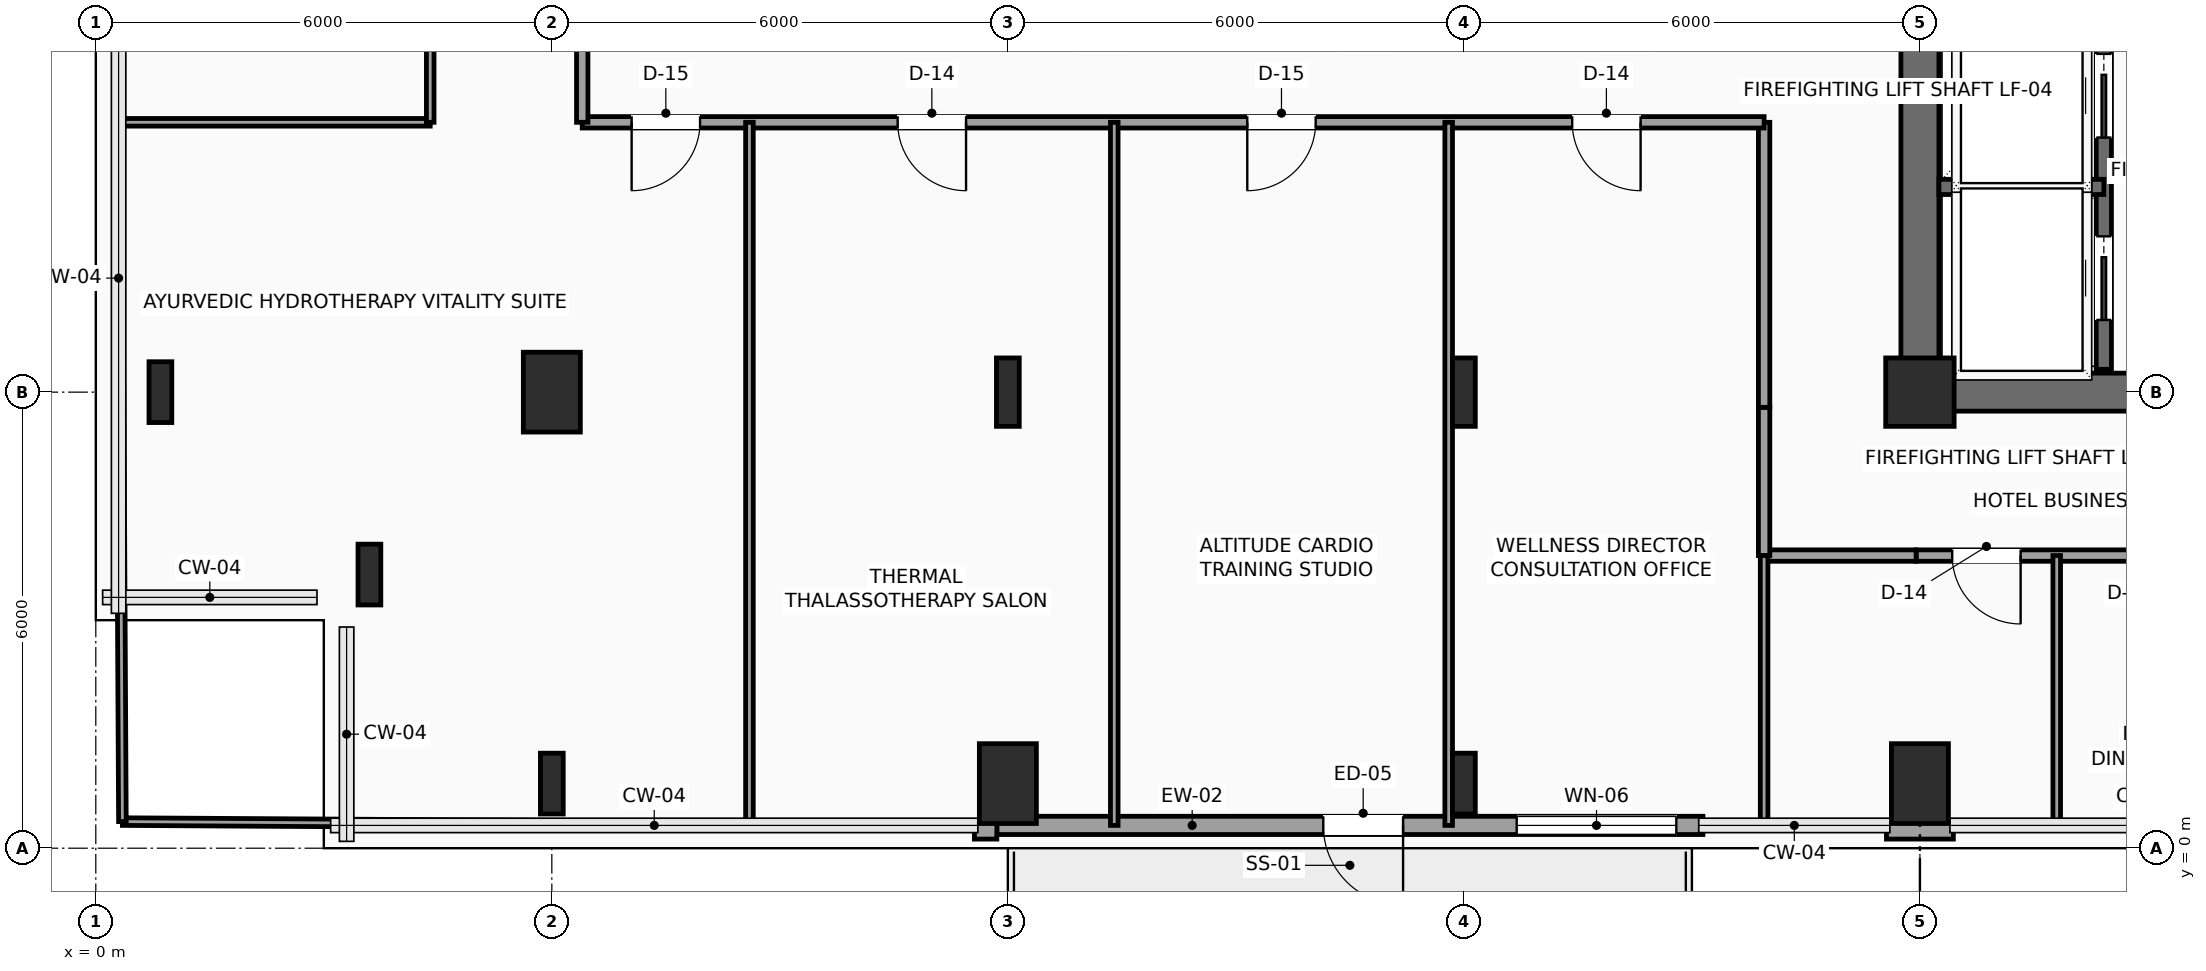
"""IFC4 building model, lengths in metres.
Left out: names, types, materials, properties, quantities, classifications, styles, units other than length and angle.
Written with IfcOpenShell. Run it as: python <this file> out.ifc"""

import sys

from ifc_helpers import new_model, si_unit, direction, frame, frame_2d, origin, origin_2d, place, context, subcontext, project, spatial, rectangle, i_section, extrude, element, fill, save


model = new_model("IFC4")
c1 = context("Model", 3, precision=1e-05, world=origin(), true_north=direction((0.0, 1.0)))
c2 = subcontext(c1, "Body", "Model", "MODEL_VIEW")
j1 = project(units=[si_unit("LENGTHUNIT", "METRE"), si_unit("PLANEANGLEUNIT", "RADIAN")], contexts=[c1])
p1 = place(None, origin())
s1 = spatial("IfcSite", under=j1, at=p1, CompositionType="ELEMENT")
p2 = place(p1, origin())
s2 = spatial("IfcBuilding", under=s1, at=p2, CompositionType="ELEMENT")
p3 = place(p2, frame((0.0, 0.0, 191.7)))
s3 = spatial("IfcBuildingStorey", under=s2, at=p3, CompositionType="ELEMENT", Elevation=191.7)
p4 = place(p3, frame((24.0, 6.0, 0.0), z_axis=(0.0, 0.0, 1.0), x_axis=(1.0, 0.0, 0.0)))
e1 = element("IfcColumn", 1, at=p4, inside=s3, PredefinedType="COLUMN", context=c2, shape_type="SweptSolid", body=[
    extrude(rectangle(XDim=0.9, YDim=0.9, at=origin_2d()), origin(), (0.0, 0.0, 1.0), 3.75),
])
for number, where, z_axis, x_axis in (
    (2, (3.6, 3.6, 0.0), (0.0, 0.0, 1.0), (1.0, 0.0, 0.0)),
    (3, (0.85, 6.0, 0.0), (0.0, 0.0, 1.0), (1.0, 0.0, 0.0)),
    (4, (6.0, 0.85, 0.0), (0.0, 0.0, 1.0), (1.0, 0.0, 0.0)),
):
    element("IfcColumn", number, at=place(p3, frame(where, z_axis=z_axis, x_axis=x_axis)), inside=s3, PredefinedType="COLUMN", context=c2, shape_type="SweptSolid", body=[
        extrude(i_section(OverallWidth=0.3, OverallDepth=0.8, WebThickness=0.018, FlangeThickness=0.033, FilletRadius=0.03, at=origin_2d()), origin(), (0.0, 0.0, 1.0), 3.75),
    ])
for number, where, z_axis, x_axis in (
    (5, (6.0, 6.0, 0.0), (0.0, 0.0, 1.0), (1.0, 0.0, 0.0)),
    (6, (12.0, 0.85, 0.0), (0.0, 0.0, 1.0), (1.0, 0.0, 0.0)),
):
    element("IfcColumn", number, at=place(p3, frame(where, z_axis=z_axis, x_axis=x_axis)), inside=s3, PredefinedType="COLUMN", context=c2, shape_type="SweptSolid", body=[
        extrude(rectangle(XDim=0.75, YDim=1.05, at=origin_2d()), origin(), (0.0, 0.0, 1.0), 3.75),
    ])
p5 = place(p3, frame((12.0, 6.0, 0.0), z_axis=(0.0, 0.0, 1.0), x_axis=(1.0, 0.0, 0.0)))
e7 = element("IfcColumn", 7, at=p5, inside=s3, PredefinedType="COLUMN", context=c2, shape_type="SweptSolid", body=[
    extrude(i_section(OverallWidth=0.3, OverallDepth=0.9, WebThickness=0.019, FlangeThickness=0.035, FilletRadius=0.03, at=origin_2d()), origin(), (0.0, 0.0, 1.0), 3.75),
])
p6 = place(p3, frame((18.0, 0.85, 0.0), z_axis=(0.0, 0.0, 1.0), x_axis=(1.0, 0.0, 0.0)))
e8 = element("IfcColumn", 8, at=p6, inside=s3, PredefinedType="COLUMN", context=c2, shape_type="SweptSolid", body=[
    extrude(i_section(OverallWidth=0.3, OverallDepth=0.8, WebThickness=0.018, FlangeThickness=0.033, FilletRadius=0.03, at=origin_2d()), origin(), (0.0, 0.0, 1.0), 3.75),
])
p7 = place(p3, frame((18.0, 6.0, 0.0), z_axis=(0.0, 0.0, 1.0), x_axis=(1.0, 0.0, 0.0)))
e9 = element("IfcColumn", 9, at=p7, inside=s3, PredefinedType="COLUMN", context=c2, shape_type="SweptSolid", body=[
    extrude(i_section(OverallWidth=0.3, OverallDepth=0.9, WebThickness=0.019, FlangeThickness=0.035, FilletRadius=0.03, at=origin_2d()), origin(), (0.0, 0.0, 1.0), 3.75),
])
p8 = place(p3, frame((24.0, 0.85, 0.0), z_axis=(0.0, 0.0, 1.0), x_axis=(1.0, 0.0, 0.0)))
e10 = element("IfcColumn", 10, at=p8, inside=s3, PredefinedType="COLUMN", context=c2, shape_type="SweptSolid", body=[
    extrude(rectangle(XDim=0.75, YDim=1.05, at=origin_2d()), origin(), (0.0, 0.0, 1.0), 3.75),
])
p9 = place(p3, frame((21.145, 0.3, 0.0), z_axis=(0.0, 0.0, 1.0), x_axis=(-1.0, 0.0, 0.0)))
e11 = element("IfcWall", 11, at=p9, inside=s3, PredefinedType="SOLIDWALL", context=c2, shape_type="SweptSolid", body=[
    extrude(rectangle(XDim=9.29, YDim=0.24, at=frame_2d((4.645, 0.0))), origin(), (0.0, 0.0, 1.0), 3.54),
])
p10 = place(p9, frame((3.945, 0.0, 0.0)))
e12 = element("IfcOpeningElement", 12, at=p10, cuts=e11, PredefinedType="OPENING", context=c2, shape_type="SweptSolid", body=[
    extrude(rectangle(XDim=1.05, YDim=2.2, at=frame_2d((0.525, 1.1))), frame((0.0, 0.13, 0.0), z_axis=(0.0, -1.0, 0.0), x_axis=(1.0, 0.0, 0.0)), (0.0, 0.0, 1.0), 0.26),
])
p11 = place(p9, frame((0.35, 0.0, 0.85)))
e13 = element("IfcOpeningElement", 13, at=p11, cuts=e11, PredefinedType="OPENING", context=c2, shape_type="SweptSolid", body=[
    extrude(rectangle(XDim=2.1, YDim=2.2, at=frame_2d((1.05, 1.1))), frame((0.0, 0.13, 0.0), z_axis=(0.0, -1.0, 0.0), x_axis=(1.0, 0.0, 0.0)), (0.0, 0.0, 1.0), 0.26),
])
p12 = place(p3, frame((24.44, 0.24, 0.0), z_axis=(0.0, 0.0, 1.0), x_axis=(-1.0, 0.0, 0.0)))
e14 = element("IfcWall", 14, at=p12, inside=s3, PredefinedType="SOLIDWALL", context=c2, shape_type="SweptSolid", body=[
    extrude(rectangle(XDim=0.88, YDim=0.24, at=frame_2d((0.44, 0.0))), origin(), (0.0, 0.0, 1.0), 3.54),
])
p13 = place(p3, frame((11.855, 0.24, 0.0), z_axis=(0.0, 0.0, 1.0), x_axis=(-1.0, 0.0, 0.0)))
e15 = element("IfcWall", 15, at=p13, inside=s3, PredefinedType="SOLIDWALL", context=c2, shape_type="SweptSolid", body=[
    extrude(rectangle(XDim=0.295, YDim=0.24, at=frame_2d((0.147, 0.0))), origin(), (0.0, 0.0, 1.0), 3.54),
])
p14 = place(p3, frame((24.0, 6.0, 0.0), z_axis=(0.0, 0.0, 1.0), x_axis=(1.0, 0.0, 0.0)))
e16 = element("IfcWall", 16, at=p14, inside=s3, PredefinedType="SHEAR", context=c2, shape_type="SweptSolid", body=[
    extrude(rectangle(XDim=9.6, YDim=0.5, at=frame_2d((4.8, 0.0))), origin(), (0.0, 0.0, 1.0), 3.54),
])
p15 = place(p3, frame((24.0, 6.0, 0.0), z_axis=(0.0, 0.0, 1.0), x_axis=(0.0, 1.0, 0.0)))
e17 = element("IfcWall", 17, at=p15, inside=s3, PredefinedType="SHEAR", context=c2, shape_type="SweptSolid", body=[
    extrude(rectangle(XDim=12.0, YDim=0.5, at=frame_2d((6.0, 0.0))), origin(), (0.0, 0.0, 1.0), 3.54),
])
p16 = place(p15, frame((7.15, 0.0, 0.0)))
e18 = element("IfcOpeningElement", 18, at=p16, cuts=e17, PredefinedType="OPENING", context=c2, shape_type="SweptSolid", body=[
    extrude(rectangle(XDim=1.6, YDim=2.3, at=frame_2d((0.8, 1.15))), frame((0.0, 0.26, 0.0), z_axis=(0.0, -1.0, 0.0), x_axis=(1.0, 0.0, 0.0)), (0.0, 0.0, 1.0), 0.52),
])
p17 = place(p3, frame((26.42, 6.3, 0.0), z_axis=(0.0, 0.0, 1.0), x_axis=(0.0, 1.0, 0.0)))
e19 = element("IfcWall", 19, at=p17, inside=s3, PredefinedType="SHEAR", context=c2, shape_type="SweptSolid", body=[
    extrude(rectangle(XDim=4.95, YDim=0.2, at=frame_2d((2.475, 0.0))), origin(), (0.0, 0.0, 1.0), 3.54),
])
p18 = place(p17, frame((0.65, 0.0, 0.0)))
e20 = element("IfcOpeningElement", 20, at=p18, cuts=e19, PredefinedType="OPENING", context=c2, shape_type="SweptSolid", body=[
    extrude(rectangle(XDim=1.1, YDim=2.2, at=frame_2d((0.55, 1.1))), frame((0.0, 0.11, 0.0), z_axis=(0.0, -1.0, 0.0), x_axis=(1.0, 0.0, 0.0)), (0.0, 0.0, 1.0), 0.22),
])
p19 = place(p17, frame((3.05, 0.0, 0.0)))
e21 = element("IfcOpeningElement", 21, at=p19, cuts=e19, PredefinedType="OPENING", context=c2, shape_type="SweptSolid", body=[
    extrude(rectangle(XDim=1.1, YDim=2.2, at=frame_2d((0.55, 1.1))), frame((0.0, 0.11, 0.0), z_axis=(0.0, -1.0, 0.0), x_axis=(1.0, 0.0, 0.0)), (0.0, 0.0, 1.0), 0.22),
])
p20 = place(p3, frame((24.25, 8.7, 0.0), z_axis=(0.0, 0.0, 1.0), x_axis=(1.0, 0.0, 0.0)))
e22 = element("IfcWall", 22, at=p20, inside=s3, PredefinedType="SHEAR", context=c2, shape_type="SweptSolid", body=[
    extrude(rectangle(XDim=2.17, YDim=0.2, at=frame_2d((1.085, 0.0))), origin(), (0.0, 0.0, 1.0), 3.54),
])
p21 = place(p3, frame((36.35, 3.85, 0.0), z_axis=(0.0, 0.0, 1.0), x_axis=(-1.0, 0.0, 0.0)))
e23 = element("IfcWall", 23, at=p21, inside=s3, PredefinedType="PARTITIONING", context=c2, shape_type="SweptSolid", body=[
    extrude(rectangle(XDim=12.4, YDim=0.15, at=frame_2d((6.2, 0.0))), origin(), (0.0, 0.0, 1.0), 3.54),
])
p22 = place(p21, frame((11.025, 0.0, 0.0)))
e24 = element("IfcOpeningElement", 24, at=p22, cuts=e23, PredefinedType="OPENING", context=c2, shape_type="SweptSolid", body=[
    extrude(rectangle(XDim=0.9, YDim=2.1, at=frame_2d((0.45, 1.05))), frame((0.0, 0.085, 0.0), z_axis=(0.0, -1.0, 0.0), x_axis=(1.0, 0.0, 0.0)), (0.0, 0.0, 1.0), 0.17),
])
p23 = place(p21, frame((8.05, 0.0, 0.0)))
e25 = element("IfcOpeningElement", 25, at=p23, cuts=e23, PredefinedType="OPENING", context=c2, shape_type="SweptSolid", body=[
    extrude(rectangle(XDim=0.9, YDim=2.1, at=frame_2d((0.45, 1.05))), frame((0.0, 0.085, 0.0), z_axis=(0.0, -1.0, 0.0), x_axis=(1.0, 0.0, 0.0)), (0.0, 0.0, 1.0), 0.17),
])
p24 = place(p21, frame((3.9, 0.0, 0.0)))
e26 = element("IfcOpeningElement", 26, at=p24, cuts=e23, PredefinedType="OPENING", context=c2, shape_type="SweptSolid", body=[
    extrude(rectangle(XDim=0.9, YDim=2.1, at=frame_2d((0.45, 1.05))), frame((0.0, 0.085, 0.0), z_axis=(0.0, -1.0, 0.0), x_axis=(1.0, 0.0, 0.0)), (0.0, 0.0, 1.0), 0.17),
])
p25 = place(p3, frame((23.95, 3.85, 0.0), z_axis=(0.0, 0.0, 1.0), x_axis=(-1.0, 0.0, 0.0)))
e27 = element("IfcWall", 27, at=p25, inside=s3, PredefinedType="PARTITIONING", context=c2, shape_type="SweptSolid", body=[
    extrude(rectangle(XDim=2.0, YDim=0.15, at=frame_2d((1.0, 0.0))), origin(), (0.0, 0.0, 1.0), 3.54),
])
p26 = place(p3, frame((21.95, 3.85, 0.0), z_axis=(0.0, 0.0, 1.0), x_axis=(0.0, 1.0, 0.0)))
e28 = element("IfcWall", 28, at=p26, inside=s3, PredefinedType="PARTITIONING", context=c2, shape_type="SweptSolid", body=[
    extrude(rectangle(XDim=1.95, YDim=0.15, at=frame_2d((0.975, 0.0))), origin(), (0.0, 0.0, 1.0), 3.54),
])
p27 = place(p3, frame((21.95, 5.8, 0.0), z_axis=(0.0, 0.0, 1.0), x_axis=(0.0, 1.0, 0.0)))
e29 = element("IfcWall", 29, at=p27, inside=s3, PredefinedType="PARTITIONING", context=c2, shape_type="SweptSolid", body=[
    extrude(rectangle(XDim=3.75, YDim=0.15, at=frame_2d((1.875, 0.0))), origin(), (0.0, 0.0, 1.0), 3.54),
])
p28 = place(p3, frame((21.95, 9.55, 0.0), z_axis=(0.0, 0.0, 1.0), x_axis=(-1.0, 0.0, 0.0)))
e30 = element("IfcWall", 30, at=p28, inside=s3, PredefinedType="PARTITIONING", context=c2, shape_type="SweptSolid", body=[
    extrude(rectangle(XDim=15.55, YDim=0.15, at=frame_2d((7.775, 0.0))), origin(), (0.0, 0.0, 1.0), 3.54),
])
p29 = place(p28, frame((14.0, 0.0, 0.0)))
e31 = element("IfcOpeningElement", 31, at=p29, cuts=e30, PredefinedType="OPENING", context=c2, shape_type="SweptSolid", body=[
    extrude(rectangle(XDim=0.9, YDim=2.1, at=frame_2d((0.45, 1.05))), frame((0.0, 0.085, 0.0), z_axis=(0.0, -1.0, 0.0), x_axis=(1.0, 0.0, 0.0)), (0.0, 0.0, 1.0), 0.17),
])
p30 = place(p28, frame((10.5, 0.0, 0.0)))
e32 = element("IfcOpeningElement", 32, at=p30, cuts=e30, PredefinedType="OPENING", context=c2, shape_type="SweptSolid", body=[
    extrude(rectangle(XDim=0.9, YDim=2.1, at=frame_2d((0.45, 1.05))), frame((0.0, 0.085, 0.0), z_axis=(0.0, -1.0, 0.0), x_axis=(1.0, 0.0, 0.0)), (0.0, 0.0, 1.0), 0.17),
])
p31 = place(p28, frame((5.9, 0.0, 0.0)))
e33 = element("IfcOpeningElement", 33, at=p31, cuts=e30, PredefinedType="OPENING", context=c2, shape_type="SweptSolid", body=[
    extrude(rectangle(XDim=0.9, YDim=2.1, at=frame_2d((0.45, 1.05))), frame((0.0, 0.085, 0.0), z_axis=(0.0, -1.0, 0.0), x_axis=(1.0, 0.0, 0.0)), (0.0, 0.0, 1.0), 0.17),
])
p32 = place(p28, frame((1.625, 0.0, 0.0)))
e34 = element("IfcOpeningElement", 34, at=p32, cuts=e30, PredefinedType="OPENING", context=c2, shape_type="SweptSolid", body=[
    extrude(rectangle(XDim=0.9, YDim=2.1, at=frame_2d((0.45, 1.05))), frame((0.0, 0.085, 0.0), z_axis=(0.0, -1.0, 0.0), x_axis=(1.0, 0.0, 0.0)), (0.0, 0.0, 1.0), 0.17),
])
p33 = place(p3, frame((6.4, 9.55, 0.0), z_axis=(0.0, 0.0, 1.0), x_axis=(0.0, 1.0, 0.0)))
e35 = element("IfcWall", 35, at=p33, inside=s3, PredefinedType="PARTITIONING", context=c2, shape_type="SweptSolid", body=[
    extrude(rectangle(XDim=1.7, YDim=0.15, at=frame_2d((0.85, 0.0))), origin(), (0.0, 0.0, 1.0), 3.54),
])
for number, where, z_axis, x_axis in (
    (36, (21.95, 0.3, 0.0), (0.0, 0.0, 1.0), (0.0, 1.0, 0.0)),
    (37, (25.8, 0.3, 0.0), (0.0, 0.0, 1.0), (0.0, 1.0, 0.0)),
):
    element("IfcWall", number, at=place(p3, frame(where, z_axis=z_axis, x_axis=x_axis)), inside=s3, PredefinedType="PARTITIONING", context=c2, shape_type="SweptSolid", body=[
        extrude(rectangle(XDim=3.55, YDim=0.1, at=frame_2d((1.775, 0.0))), origin(), (0.0, 0.0, 1.0), 3.54),
    ])
p34 = place(p3, frame((0.35, 0.35, 0.0), z_axis=(0.0, 0.0, 1.0), x_axis=(0.999981599147, -0.006066412992, 0.0)))
e38 = element("IfcWall", 38, at=p34, inside=s3, PredefinedType="PARTITIONING", context=c2, shape_type="SweptSolid", body=[
    extrude(rectangle(XDim=8.25, YDim=0.1, at=frame_2d((4.125, 0.0))), origin(), (0.0, 0.0, 1.0), 3.54),
])
p35 = place(p3, frame((0.35, 0.35, 0.0), z_axis=(0.0, 0.0, 1.0), x_axis=(-0.005440038388, 0.999985202882, 0.0)))
e39 = element("IfcWall", 39, at=p35, inside=s3, PredefinedType="PARTITIONING", context=c2, shape_type="SweptSolid", body=[
    extrude(rectangle(XDim=9.2, YDim=0.1, at=frame_2d((4.6, 0.0))), origin(), (0.0, 0.0, 1.0), 3.54),
])
for number, where, z_axis, x_axis in (
    (40, (8.6, 0.3, 0.0), (0.0, 0.0, 1.0), (0.0, 1.0, 0.0)),
    (41, (13.4, 0.3, 0.0), (0.0, 0.0, 1.0), (0.0, 1.0, 0.0)),
):
    element("IfcWall", number, at=place(p3, frame(where, z_axis=z_axis, x_axis=x_axis)), inside=s3, PredefinedType="PARTITIONING", context=c2, shape_type="SweptSolid", body=[
        extrude(rectangle(XDim=9.25, YDim=0.1, at=frame_2d((4.625, 0.0))), origin(), (0.0, 0.0, 1.0), 3.54),
    ])
p36 = place(p3, frame((17.8, 0.3, 0.0), z_axis=(0.0, 0.0, 1.0), x_axis=(0.0, 1.0, 0.0)))
e42 = element("IfcWall", 42, at=p36, inside=s3, PredefinedType="PARTITIONING", context=c2, shape_type="SweptSolid", body=[
    extrude(rectangle(XDim=9.25, YDim=0.1, at=frame_2d((4.625, 0.0))), origin(), (0.0, 0.0, 1.0), 3.132),
])
p37 = place(p3, frame((0.3, 9.55, 0.0), z_axis=(0.0, 0.0, 1.0), x_axis=(1.0, 0.0, 0.0)))
e43 = element("IfcWall", 43, at=p37, inside=s3, PredefinedType="PARTITIONING", context=c2, shape_type="SweptSolid", body=[
    extrude(rectangle(XDim=4.1, YDim=0.1, at=frame_2d((2.05, 0.0))), origin(), (0.0, 0.0, 1.0), 3.54),
])
p38 = place(p3, frame((4.4, 9.55, 0.0), z_axis=(0.0, 0.0, 1.0), x_axis=(0.0, 1.0, 0.0)))
e44 = element("IfcWall", 44, at=p38, inside=s3, PredefinedType="PARTITIONING", context=c2, shape_type="SweptSolid", body=[
    extrude(rectangle(XDim=6.7, YDim=0.1, at=frame_2d((3.35, 0.0))), origin(), (0.0, 0.0, 1.0), 3.54),
])
p39 = place(p10, origin())
e45 = element("IfcDoor", 45, at=p39, inside=s3, OperationType="SINGLE_SWING_LEFT", PredefinedType="DOOR", context=c2, shape_type="SweptSolid", body=[
    extrude(rectangle(XDim=1.05, YDim=2.2, at=frame_2d((0.525, 1.1))), frame((0.0, 0.025, 0.0), z_axis=(0.0, -1.0, 0.0), x_axis=(1.0, 0.0, 0.0)), (0.0, 0.0, 1.0), 0.05),
])
fill(e12, e45)
p40 = place(p11, origin())
e46 = element("IfcWindow", 46, at=p40, inside=s3, PartitioningType="SINGLE_PANEL", PredefinedType="WINDOW", context=c2, shape_type="SweptSolid", body=[
    extrude(rectangle(XDim=2.1, YDim=2.2, at=frame_2d((1.05, 1.1))), frame((0.0, 0.03, 0.0), z_axis=(0.0, -1.0, 0.0), x_axis=(1.0, 0.0, 0.0)), (0.0, 0.0, 1.0), 0.06),
])
fill(e13, e46)
p41 = place(p18, origin())
e47 = element("IfcDoor", 47, at=p41, inside=s3, OperationType="SLIDING_TO_LEFT", PredefinedType="DOOR", context=c2, shape_type="SweptSolid", body=[
    extrude(rectangle(XDim=1.1, YDim=2.2, at=frame_2d((0.55, 1.1))), frame((0.0, 0.025, 0.0), z_axis=(0.0, -1.0, 0.0), x_axis=(1.0, 0.0, 0.0)), (0.0, 0.0, 1.0), 0.05),
])
fill(e20, e47)
p42 = place(p19, origin())
e48 = element("IfcDoor", 48, at=p42, inside=s3, OperationType="SLIDING_TO_LEFT", PredefinedType="DOOR", context=c2, shape_type="SweptSolid", body=[
    extrude(rectangle(XDim=1.1, YDim=2.2, at=frame_2d((0.55, 1.1))), frame((0.0, 0.025, 0.0), z_axis=(0.0, -1.0, 0.0), x_axis=(1.0, 0.0, 0.0)), (0.0, 0.0, 1.0), 0.05),
])
fill(e21, e48)
p43 = place(p22, origin())
e49 = element("IfcDoor", 49, at=p43, inside=s3, OperationType="SINGLE_SWING_LEFT", PredefinedType="DOOR", context=c2, shape_type="SweptSolid", body=[
    extrude(rectangle(XDim=0.9, YDim=2.1, at=frame_2d((0.45, 1.05))), frame((0.0, 0.025, 0.0), z_axis=(0.0, -1.0, 0.0), x_axis=(1.0, 0.0, 0.0)), (0.0, 0.0, 1.0), 0.05),
])
fill(e24, e49)
p44 = place(p29, origin())
e50 = element("IfcDoor", 50, at=p44, inside=s3, OperationType="SINGLE_SWING_RIGHT", PredefinedType="DOOR", context=c2, shape_type="SweptSolid", body=[
    extrude(rectangle(XDim=0.9, YDim=2.1, at=frame_2d((0.45, 1.05))), frame((0.0, 0.025, 0.0), z_axis=(0.0, -1.0, 0.0), x_axis=(1.0, 0.0, 0.0)), (0.0, 0.0, 1.0), 0.05),
])
fill(e31, e50)
p45 = place(p30, origin())
e51 = element("IfcDoor", 51, at=p45, inside=s3, OperationType="SINGLE_SWING_LEFT", PredefinedType="DOOR", context=c2, shape_type="SweptSolid", body=[
    extrude(rectangle(XDim=0.9, YDim=2.1, at=frame_2d((0.45, 1.05))), frame((0.0, 0.025, 0.0), z_axis=(0.0, -1.0, 0.0), x_axis=(1.0, 0.0, 0.0)), (0.0, 0.0, 1.0), 0.05),
])
fill(e32, e51)
p46 = place(p31, origin())
e52 = element("IfcDoor", 52, at=p46, inside=s3, OperationType="SINGLE_SWING_RIGHT", PredefinedType="DOOR", context=c2, shape_type="SweptSolid", body=[
    extrude(rectangle(XDim=0.9, YDim=2.1, at=frame_2d((0.45, 1.05))), frame((0.0, 0.025, 0.0), z_axis=(0.0, -1.0, 0.0), x_axis=(1.0, 0.0, 0.0)), (0.0, 0.0, 1.0), 0.05),
])
fill(e33, e52)
p47 = place(p32, origin())
e53 = element("IfcDoor", 53, at=p47, inside=s3, OperationType="SINGLE_SWING_LEFT", PredefinedType="DOOR", context=c2, shape_type="SweptSolid", body=[
    extrude(rectangle(XDim=0.9, YDim=2.1, at=frame_2d((0.45, 1.05))), frame((0.0, 0.025, 0.0), z_axis=(0.0, -1.0, 0.0), x_axis=(1.0, 0.0, 0.0)), (0.0, 0.0, 1.0), 0.05),
])
fill(e34, e53)
save(model, sys.argv[1])
